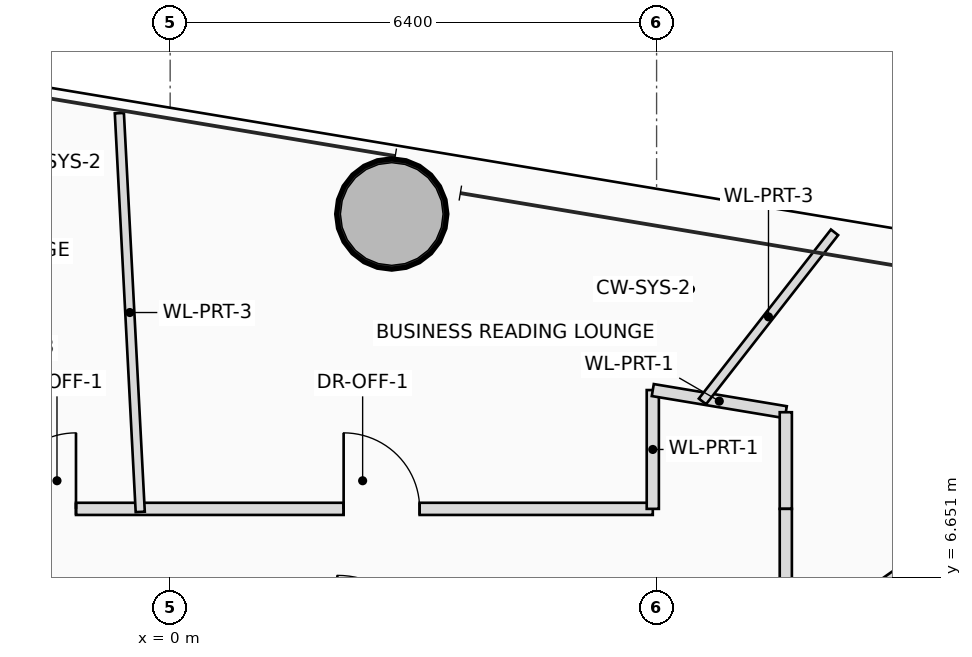
"""IFC4 building model, lengths in metres.
Left out: names, types, materials, properties, quantities, classifications, styles, units other than length and angle.
Written with IfcOpenShell. Run it as: python <this file> out.ifc"""

import sys

from ifc_helpers import new_model, si_unit, direction, frame, frame_2d, origin, origin_2d, place, context, subcontext, project, spatial, rectangle, hollow_circle, extrude, source, transform, mapped, element, fill, save


model = new_model("IFC4")
c1 = context("Model", 3, precision=1e-05, world=origin(), true_north=direction((0.0, 1.0)))
c2 = subcontext(c1, "Body", "Model", "MODEL_VIEW")
j1 = project(units=[si_unit("LENGTHUNIT", "METRE"), si_unit("PLANEANGLEUNIT", "RADIAN")], contexts=[c1])
p1 = place(None, origin())
s1 = spatial("IfcSite", under=j1, at=p1, CompositionType="ELEMENT")
p2 = place(p1, origin())
s2 = spatial("IfcBuilding", under=s1, at=p2, CompositionType="ELEMENT")
p3 = place(p2, frame((0.0, 0.0, 104.9)))
s3 = spatial("IfcBuildingStorey", under=s2, at=p3, CompositionType="ELEMENT", Elevation=104.9)
m1 = source(origin(), c2, "Body", "SweptSolid", [
    extrude(hollow_circle(Radius=0.725, WallThickness=0.05, at=origin_2d()), origin(), (0.0, 0.0, 1.0), 3.75),
])
p4 = place(p3, frame((2.915, 11.429, 0.0), z_axis=(0.0, 0.0, 1.0), x_axis=(1.0, 0.0, 0.0)))
e1 = element("IfcColumn", 1, at=p4, inside=s3, PredefinedType="COLUMN", context=c2, shape_type="MappedRepresentation", body=[
    mapped(m1, transform((0.0, 0.0, 0.0), scale=1.0)),
])
p5 = place(p3, frame((-6.35, 7.55, 0.0), z_axis=(0.0, 0.0, 1.0), x_axis=(1.0, 0.0, 0.0)))
e2 = element("IfcWall", 2, at=p5, inside=s3, PredefinedType="PARTITIONING", context=c2, shape_type="SweptSolid", body=[
    extrude(rectangle(XDim=12.7, YDim=0.16, at=frame_2d((6.35, 0.0))), origin(), (0.0, 0.0, 1.0), 2.85),
])
p6 = place(p5, frame((4.111, 0.0, 0.0)))
e3 = element("IfcOpeningElement", 3, at=p6, cuts=e2, PredefinedType="OPENING", context=c2, shape_type="SweptSolid", body=[
    extrude(rectangle(XDim=1.0, YDim=2.25, at=frame_2d((0.5, 1.125))), frame((0.0, 0.09, 0.0), z_axis=(0.0, -1.0, 0.0), x_axis=(1.0, 0.0, 0.0)), (0.0, 0.0, 1.0), 0.18),
])
p7 = place(p5, frame((8.632, 0.0, 0.0)))
e4 = element("IfcOpeningElement", 4, at=p7, cuts=e2, PredefinedType="OPENING", context=c2, shape_type="SweptSolid", body=[
    extrude(rectangle(XDim=1.0, YDim=2.25, at=frame_2d((0.5, 1.125))), frame((0.0, 0.09, 0.0), z_axis=(0.0, -1.0, 0.0), x_axis=(1.0, 0.0, 0.0)), (0.0, 0.0, 1.0), 0.18),
])
p8 = place(p3, frame((6.35, 7.55, 0.0), z_axis=(0.0, 0.0, 1.0), x_axis=(0.0, 1.0, 0.0)))
e5 = element("IfcWall", 5, at=p8, inside=s3, PredefinedType="PARTITIONING", context=c2, shape_type="SweptSolid", body=[
    extrude(rectangle(XDim=1.563, YDim=0.16, at=frame_2d((0.781, 0.0))), origin(), (0.0, 0.0, 1.0), 3.05),
])
p9 = place(p3, frame((6.35, 9.113, 0.0), z_axis=(0.0, 0.0, 1.0), x_axis=(0.986386484459, -0.164443617317, 0.0)))
e6 = element("IfcWall", 6, at=p9, inside=s3, PredefinedType="PARTITIONING", context=c2, shape_type="SweptSolid", body=[
    extrude(rectangle(XDim=1.774, YDim=0.16, at=frame_2d((0.887, 0.0))), origin(), (0.0, 0.0, 1.0), 3.2),
])
p10 = place(p3, frame((8.1, 8.821, 0.0), z_axis=(0.0, 0.0, 1.0), x_axis=(0.0, -1.0, 0.0)))
e7 = element("IfcWall", 7, at=p10, inside=s3, PredefinedType="PARTITIONING", context=c2, shape_type="SweptSolid", body=[
    extrude(rectangle(XDim=1.271, YDim=0.16, at=frame_2d((0.636, 0.0))), origin(), (0.0, 0.0, 1.0), 2.85),
])
p11 = place(p3, frame((8.1, 7.55, 0.0), z_axis=(0.0, 0.0, 1.0), x_axis=(0.0, -1.0, 0.0)))
e8 = element("IfcWall", 8, at=p11, inside=s3, PredefinedType="PARTITIONING", context=c2, shape_type="SweptSolid", body=[
    extrude(rectangle(XDim=7.53, YDim=0.16, at=frame_2d((3.765, 0.0))), origin(), (0.0, 0.0, 1.0), 2.85),
])
p12 = place(p11, frame((4.082, 0.0, 0.0)))
e9 = element("IfcOpeningElement", 9, at=p12, cuts=e8, PredefinedType="OPENING", context=c2, shape_type="SweptSolid", body=[
    extrude(rectangle(XDim=1.0, YDim=2.25, at=frame_2d((0.5, 1.125))), frame((0.0, 0.09, 0.0), z_axis=(0.0, -1.0, 0.0), x_axis=(1.0, 0.0, 0.0)), (0.0, 0.0, 1.0), 0.18),
])
p13 = place(p3, frame((8.06, 5.644, 0.0), z_axis=(0.0, 0.0, 1.0), x_axis=(0.819162822725, 0.573561042841, 0.0)))
e10 = element("IfcWall", 10, at=p13, inside=s3, PredefinedType="PARTITIONING", context=c2, shape_type="SweptSolid", body=[
    extrude(rectangle(XDim=7.968, YDim=0.12, at=frame_2d((3.984, 0.0))), origin(), (0.0, 0.0, 1.0), 2.85),
])
p14 = place(p3, frame((7.003, 8.964, 0.0), z_axis=(0.0, 0.0, 1.0), x_axis=(0.615657467661, 0.788013884721, 0.0)))
e11 = element("IfcWall", 11, at=p14, inside=s3, PredefinedType="PARTITIONING", context=c2, shape_type="SweptSolid", body=[
    extrude(rectangle(XDim=2.823, YDim=0.12, at=frame_2d((1.412, 0.0))), origin(), (0.0, 0.0, 1.0), 3.01),
])
p15 = place(p3, frame((-0.394, 7.51, 0.0), z_axis=(0.0, 0.0, 1.0), x_axis=(-0.052329543677, 0.998629870802, 0.0)))
e12 = element("IfcWall", 12, at=p15, inside=s3, PredefinedType="PARTITIONING", context=c2, shape_type="SweptSolid", body=[
    extrude(rectangle(XDim=5.253, YDim=0.12, at=frame_2d((2.626, 0.0))), origin(), (0.0, 0.0, 1.0), 3.01),
])
p16 = place(p6, origin())
e13 = element("IfcDoor", 13, at=p16, inside=s3, OperationType="SINGLE_SWING_RIGHT", PredefinedType="DOOR", context=c2, shape_type="SweptSolid", body=[
    extrude(rectangle(XDim=1.0, YDim=2.25, at=frame_2d((0.5, 1.125))), frame((0.0, 0.025, 0.0), z_axis=(0.0, -1.0, 0.0), x_axis=(1.0, 0.0, 0.0)), (0.0, 0.0, 1.0), 0.05),
])
fill(e3, e13)
p17 = place(p7, origin())
e14 = element("IfcDoor", 14, at=p17, inside=s3, OperationType="SINGLE_SWING_LEFT", PredefinedType="DOOR", context=c2, shape_type="SweptSolid", body=[
    extrude(rectangle(XDim=1.0, YDim=2.25, at=frame_2d((0.5, 1.125))), frame((0.0, 0.025, 0.0), z_axis=(0.0, -1.0, 0.0), x_axis=(1.0, 0.0, 0.0)), (0.0, 0.0, 1.0), 0.05),
])
fill(e4, e14)
save(model, sys.argv[1])
